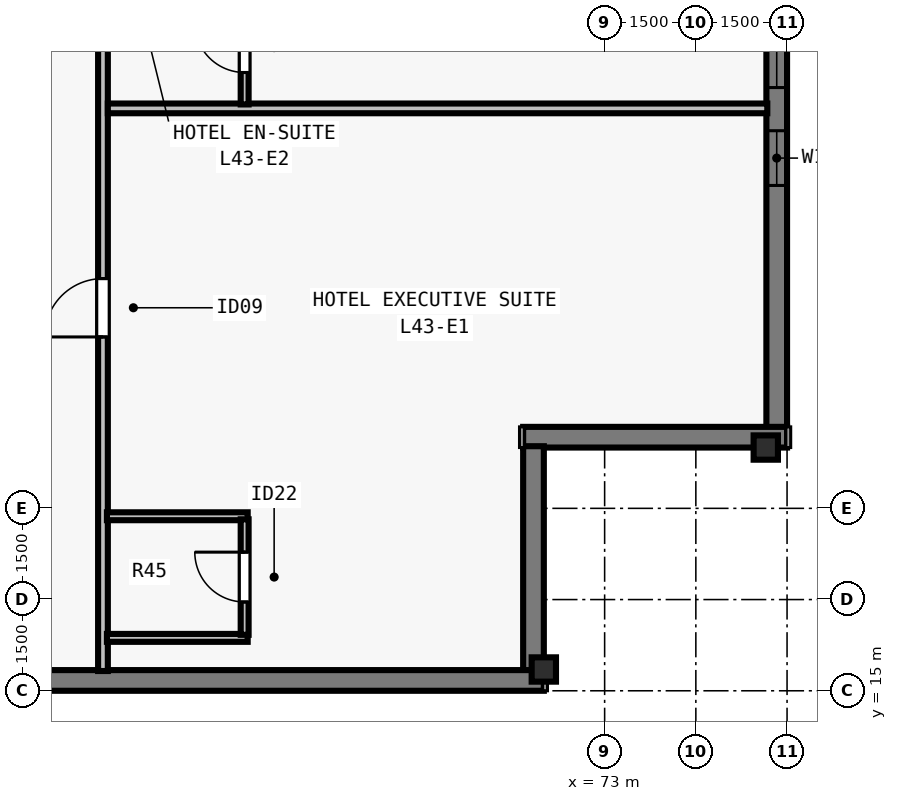
"""IFC4 building model, lengths in metres.
Left out: names, types, materials, properties, quantities, classifications, styles, units other than length and angle.
Written with IfcOpenShell. Run it as: python <this file> out.ifc"""

import sys

from ifc_helpers import new_model, si_unit, direction, frame, frame_2d, origin, origin_2d, place, context, subcontext, project, spatial, rectangle, i_section, extrude, element, fill, save


model = new_model("IFC4")
c1 = context("Model", 3, precision=1e-05, world=origin(), true_north=direction((0.0, 1.0)))
c2 = subcontext(c1, "Body", "Model", "MODEL_VIEW")
j1 = project(units=[si_unit("LENGTHUNIT", "METRE"), si_unit("PLANEANGLEUNIT", "RADIAN")], contexts=[c1])
p1 = place(None, origin())
s1 = spatial("IfcSite", under=j1, at=p1, CompositionType="ELEMENT")
p2 = place(p1, origin())
s2 = spatial("IfcBuilding", under=s1, at=p2, CompositionType="ELEMENT")
p3 = place(p2, frame((0.0, 0.0, 158.5)))
s3 = spatial("IfcBuildingStorey", under=s2, at=p3, CompositionType="ELEMENT", Elevation=158.5)
for number, where, z_axis, x_axis in (
    (1, (72.0, 15.35, 0.0), (0.0, 0.0, 1.0), (1.0, 0.0, 0.0)),
    (2, (75.65, 19.0, 0.0), (0.0, 0.0, 1.0), (0.0, 1.0, 0.0)),
):
    element("IfcColumn", number, at=place(p3, frame(where, z_axis=z_axis, x_axis=x_axis)), inside=s3, PredefinedType="COLUMN", context=c2, shape_type="SweptSolid", body=[
        extrude(i_section(OverallWidth=0.4, OverallDepth=0.4, WebThickness=0.022, FlangeThickness=0.036, at=origin_2d()), origin(), (0.0, 0.0, 1.0), 3.5),
    ])
p4 = place(p3, frame((75.83, 59.0, 0.0), z_axis=(0.0, 0.0, 1.0), x_axis=(0.0, -1.0, 0.0)))
e3 = element("IfcWall", 3, at=p4, inside=s3, PredefinedType="SOLIDWALL", context=c2, shape_type="SweptSolid", body=[
    extrude(rectangle(XDim=39.682, YDim=0.34, at=frame_2d((19.841, 0.0))), origin(), (0.0, 0.0, 1.0), 3.28),
])
p5 = place(p4, frame((6.002, 0.0, 0.8)))
e4 = element("IfcOpeningElement", 4, at=p5, cuts=e3, PredefinedType="OPENING", context=c2, shape_type="SweptSolid", body=[
    extrude(rectangle(XDim=1.75, YDim=1.66, at=frame_2d((0.875, 0.83))), frame((0.0, 0.18, 0.0), z_axis=(0.0, -1.0, 0.0), x_axis=(1.0, 0.0, 0.0)), (0.0, 0.0, 1.0), 0.36),
])
p6 = place(p4, frame((8.505, 0.0, 0.8)))
e5 = element("IfcOpeningElement", 5, at=p6, cuts=e3, PredefinedType="OPENING", context=c2, shape_type="SweptSolid", body=[
    extrude(rectangle(XDim=1.35, YDim=1.66, at=frame_2d((0.675, 0.83))), frame((0.0, 0.18, 0.0), z_axis=(0.0, -1.0, 0.0), x_axis=(1.0, 0.0, 0.0)), (0.0, 0.0, 1.0), 0.36),
])
p7 = place(p4, frame((11.859, 0.0, 0.8)))
e6 = element("IfcOpeningElement", 6, at=p7, cuts=e3, PredefinedType="OPENING", context=c2, shape_type="SweptSolid", body=[
    extrude(rectangle(XDim=1.75, YDim=1.66, at=frame_2d((0.875, 0.83))), frame((0.0, 0.18, 0.0), z_axis=(0.0, -1.0, 0.0), x_axis=(1.0, 0.0, 0.0)), (0.0, 0.0, 1.0), 0.36),
])
p8 = place(p4, frame((16.062, 0.0, 0.8)))
e7 = element("IfcOpeningElement", 7, at=p8, cuts=e3, PredefinedType="OPENING", context=c2, shape_type="SweptSolid", body=[
    extrude(rectangle(XDim=1.35, YDim=1.66, at=frame_2d((0.675, 0.83))), frame((0.0, 0.18, 0.0), z_axis=(0.0, -1.0, 0.0), x_axis=(1.0, 0.0, 0.0)), (0.0, 0.0, 1.0), 0.36),
])
p9 = place(p4, frame((18.966, 0.0, 0.8)))
e8 = element("IfcOpeningElement", 8, at=p9, cuts=e3, PredefinedType="OPENING", context=c2, shape_type="SweptSolid", body=[
    extrude(rectangle(XDim=1.75, YDim=1.66, at=frame_2d((0.875, 0.83))), frame((0.0, 0.18, 0.0), z_axis=(0.0, -1.0, 0.0), x_axis=(1.0, 0.0, 0.0)), (0.0, 0.0, 1.0), 0.36),
])
p10 = place(p4, frame((22.719, 0.0, 0.8)))
e9 = element("IfcOpeningElement", 9, at=p10, cuts=e3, PredefinedType="OPENING", context=c2, shape_type="SweptSolid", body=[
    extrude(rectangle(XDim=1.35, YDim=1.66, at=frame_2d((0.675, 0.83))), frame((0.0, 0.18, 0.0), z_axis=(0.0, -1.0, 0.0), x_axis=(1.0, 0.0, 0.0)), (0.0, 0.0, 1.0), 0.36),
])
p11 = place(p4, frame((26.073, 0.0, 0.8)))
e10 = element("IfcOpeningElement", 10, at=p11, cuts=e3, PredefinedType="OPENING", context=c2, shape_type="SweptSolid", body=[
    extrude(rectangle(XDim=1.75, YDim=1.66, at=frame_2d((0.875, 0.83))), frame((0.0, 0.18, 0.0), z_axis=(0.0, -1.0, 0.0), x_axis=(1.0, 0.0, 0.0)), (0.0, 0.0, 1.0), 0.36),
])
p12 = place(p4, frame((29.827, 0.0, 0.8)))
e11 = element("IfcOpeningElement", 11, at=p12, cuts=e3, PredefinedType="OPENING", context=c2, shape_type="SweptSolid", body=[
    extrude(rectangle(XDim=1.35, YDim=1.66, at=frame_2d((0.675, 0.83))), frame((0.0, 0.18, 0.0), z_axis=(0.0, -1.0, 0.0), x_axis=(1.0, 0.0, 0.0)), (0.0, 0.0, 1.0), 0.36),
])
p13 = place(p4, frame((32.33, 0.0, 0.8)))
e12 = element("IfcOpeningElement", 12, at=p13, cuts=e3, PredefinedType="OPENING", context=c2, shape_type="SweptSolid", body=[
    extrude(rectangle(XDim=1.75, YDim=1.66, at=frame_2d((0.875, 0.83))), frame((0.0, 0.18, 0.0), z_axis=(0.0, -1.0, 0.0), x_axis=(1.0, 0.0, 0.0)), (0.0, 0.0, 1.0), 0.36),
])
p14 = place(p4, frame((34.79, 0.0, 0.8)))
e13 = element("IfcOpeningElement", 13, at=p14, cuts=e3, PredefinedType="OPENING", context=c2, shape_type="SweptSolid", body=[
    extrude(rectangle(XDim=0.9, YDim=1.66, at=frame_2d((0.45, 0.83))), frame((0.0, 0.18, 0.0), z_axis=(0.0, -1.0, 0.0), x_axis=(1.0, 0.0, 0.0)), (0.0, 0.0, 1.0), 0.36),
])
p15 = place(p3, frame((76.0, 19.17, 0.0), z_axis=(0.0, 0.0, 1.0), x_axis=(-1.0, 0.0, 0.0)))
e14 = element("IfcWall", 14, at=p15, inside=s3, PredefinedType="SOLIDWALL", context=c2, shape_type="SweptSolid", body=[
    extrude(rectangle(XDim=4.34, YDim=0.34, at=frame_2d((2.17, 0.0))), origin(), (0.0, 0.0, 1.0), 3.28),
])
p16 = place(p3, frame((71.83, 19.022, 0.0), z_axis=(0.0, 0.0, 1.0), x_axis=(0.0, -1.0, 0.0)))
e15 = element("IfcWall", 15, at=p16, inside=s3, PredefinedType="SOLIDWALL", context=c2, shape_type="SweptSolid", body=[
    extrude(rectangle(XDim=3.704, YDim=0.34, at=frame_2d((1.852, 0.0))), origin(), (0.0, 0.0, 1.0), 3.28),
])
p17 = place(p3, frame((72.0, 15.17, 0.0), z_axis=(0.0, 0.0, 1.0), x_axis=(-1.0, 0.0, 0.0)))
e16 = element("IfcWall", 16, at=p17, inside=s3, PredefinedType="SOLIDWALL", context=c2, shape_type="SweptSolid", body=[
    extrude(rectangle(XDim=15.482, YDim=0.34, at=frame_2d((7.741, 0.0))), origin(), (0.0, 0.0, 1.0), 3.28),
])
p18 = place(p17, frame((11.627, 0.0, 0.8)))
e17 = element("IfcOpeningElement", 17, at=p18, cuts=e16, PredefinedType="OPENING", context=c2, shape_type="SweptSolid", body=[
    extrude(rectangle(XDim=1.75, YDim=1.66, at=frame_2d((0.875, 0.83))), frame((0.0, 0.18, 0.0), z_axis=(0.0, -1.0, 0.0), x_axis=(1.0, 0.0, 0.0)), (0.0, 0.0, 1.0), 0.36),
])
p19 = place(p3, frame((64.75, 15.325, 0.0), z_axis=(0.0, 0.0, 1.0), x_axis=(0.0, 1.0, 0.0)))
e18 = element("IfcWall", 18, at=p19, inside=s3, PredefinedType="PARTITIONING", context=c2, shape_type="SweptSolid", body=[
    extrude(rectangle(XDim=47.35, YDim=0.16, at=frame_2d((23.675, 0.0))), origin(), (0.0, 0.0, 1.0), 2.555),
])
p20 = place(p19, frame((5.494, 0.0, 0.0)))
e19 = element("IfcOpeningElement", 19, at=p20, cuts=e18, PredefinedType="OPENING", context=c2, shape_type="SweptSolid", body=[
    extrude(rectangle(XDim=0.96, YDim=2.15, at=frame_2d((0.48, 1.075))), frame((0.0, 0.09, 0.0), z_axis=(0.0, -1.0, 0.0), x_axis=(1.0, 0.0, 0.0)), (0.0, 0.0, 1.0), 0.18),
])
p21 = place(p19, frame((14.796, 0.0, 0.0)))
e20 = element("IfcOpeningElement", 20, at=p21, cuts=e18, PredefinedType="OPENING", context=c2, shape_type="SweptSolid", body=[
    extrude(rectangle(XDim=0.96, YDim=2.15, at=frame_2d((0.48, 1.075))), frame((0.0, 0.09, 0.0), z_axis=(0.0, -1.0, 0.0), x_axis=(1.0, 0.0, 0.0)), (0.0, 0.0, 1.0), 0.18),
])
p22 = place(p19, frame((24.228, 0.0, 0.0)))
e21 = element("IfcOpeningElement", 21, at=p22, cuts=e18, PredefinedType="OPENING", context=c2, shape_type="SweptSolid", body=[
    extrude(rectangle(XDim=0.96, YDim=2.15, at=frame_2d((0.48, 1.075))), frame((0.0, 0.09, 0.0), z_axis=(0.0, -1.0, 0.0), x_axis=(1.0, 0.0, 0.0)), (0.0, 0.0, 1.0), 0.18),
])
p23 = place(p19, frame((33.66, 0.0, 0.0)))
e22 = element("IfcOpeningElement", 22, at=p23, cuts=e18, PredefinedType="OPENING", context=c2, shape_type="SweptSolid", body=[
    extrude(rectangle(XDim=0.96, YDim=2.15, at=frame_2d((0.48, 1.075))), frame((0.0, 0.09, 0.0), z_axis=(0.0, -1.0, 0.0), x_axis=(1.0, 0.0, 0.0)), (0.0, 0.0, 1.0), 0.18),
])
p24 = place(p19, frame((43.229, 0.0, 0.0)))
e23 = element("IfcOpeningElement", 23, at=p24, cuts=e18, PredefinedType="OPENING", context=c2, shape_type="SweptSolid", body=[
    extrude(rectangle(XDim=0.96, YDim=2.15, at=frame_2d((0.48, 1.075))), frame((0.0, 0.09, 0.0), z_axis=(0.0, -1.0, 0.0), x_axis=(1.0, 0.0, 0.0)), (0.0, 0.0, 1.0), 0.18),
])
for number, where, z_axis, x_axis in (
    (24, (64.815, 15.87, 0.0), (0.0, 0.0, 1.0), (1.0, 0.0, 0.0)),
    (25, (64.815, 17.87, 0.0), (0.0, 0.0, 1.0), (1.0, 0.0, 0.0)),
):
    element("IfcWall", number, at=place(p3, frame(where, z_axis=z_axis, x_axis=x_axis)), inside=s3, PredefinedType="PLUMBINGWALL", context=c2, shape_type="SweptSolid", body=[
        extrude(rectangle(XDim=2.315, YDim=0.13, at=frame_2d((1.157, 0.0))), origin(), (0.0, 0.0, 1.0), 3.28),
    ])
p25 = place(p3, frame((67.08, 15.92, 0.0), z_axis=(0.0, 0.0, 1.0), x_axis=(0.0, 1.0, 0.0)))
e26 = element("IfcWall", 26, at=p25, inside=s3, PredefinedType="PLUMBINGWALL", context=c2, shape_type="SweptSolid", body=[
    extrude(rectangle(XDim=1.9, YDim=0.13, at=frame_2d((0.95, 0.0))), origin(), (0.0, 0.0, 1.0), 3.28),
])
p26 = place(p25, frame((0.54, 0.0, 0.0)))
e27 = element("IfcOpeningElement", 27, at=p26, cuts=e26, PredefinedType="OPENING", context=c2, shape_type="SweptSolid", body=[
    extrude(rectangle(XDim=0.82, YDim=2.1, at=frame_2d((0.41, 1.05))), frame((0.0, 0.075, 0.0), z_axis=(0.0, -1.0, 0.0), x_axis=(1.0, 0.0, 0.0)), (0.0, 0.0, 1.0), 0.15),
])
p27 = place(p3, frame((64.83, 24.577, 0.0), z_axis=(0.0, 0.0, 1.0), x_axis=(1.0, 0.0, 0.0)))
e28 = element("IfcWall", 28, at=p27, inside=s3, PredefinedType="PARTITIONING", context=c2, shape_type="SweptSolid", body=[
    extrude(rectangle(XDim=10.845, YDim=0.16, at=frame_2d((5.422, 0.0))), origin(), (0.0, 0.0, 1.0), 2.896),
])
p28 = place(p3, frame((67.08, 24.642, 0.0), z_axis=(0.0, 0.0, 1.0), x_axis=(0.0, 1.0, 0.0)))
e29 = element("IfcWall", 29, at=p28, inside=s3, PredefinedType="PLUMBINGWALL", context=c2, shape_type="SweptSolid", body=[
    extrude(rectangle(XDim=1.885, YDim=0.13, at=frame_2d((0.942, 0.0))), origin(), (0.0, 0.0, 1.0), 3.28),
])
p29 = place(p28, frame((0.525, 0.0, 0.0)))
e30 = element("IfcOpeningElement", 30, at=p29, cuts=e29, PredefinedType="OPENING", context=c2, shape_type="SweptSolid", body=[
    extrude(rectangle(XDim=0.82, YDim=2.1, at=frame_2d((0.41, 1.05))), frame((0.0, 0.075, 0.0), z_axis=(0.0, -1.0, 0.0), x_axis=(1.0, 0.0, 0.0)), (0.0, 0.0, 1.0), 0.15),
])
p30 = place(p13, origin())
e31 = element("IfcWindow", 31, at=p30, inside=s3, PartitioningType="SINGLE_PANEL", PredefinedType="WINDOW", context=c2, shape_type="SweptSolid", body=[
    extrude(rectangle(XDim=1.75, YDim=1.66, at=frame_2d((0.875, 0.83))), frame((0.0, -0.05, 0.0), z_axis=(0.0, -1.0, 0.0), x_axis=(1.0, 0.0, 0.0)), (0.0, 0.0, 1.0), 0.06),
])
fill(e12, e31)
p31 = place(p14, origin())
e32 = element("IfcWindow", 32, at=p31, inside=s3, PartitioningType="SINGLE_PANEL", PredefinedType="WINDOW", context=c2, shape_type="SweptSolid", body=[
    extrude(rectangle(XDim=0.9, YDim=1.66, at=frame_2d((0.45, 0.83))), frame((0.0, -0.04, 0.0), z_axis=(0.0, -1.0, 0.0), x_axis=(1.0, 0.0, 0.0)), (0.0, 0.0, 1.0), 0.06),
])
fill(e13, e32)
p32 = place(p26, origin())
e33 = element("IfcDoor", 33, at=p32, inside=s3, OperationType="SINGLE_SWING_RIGHT", PredefinedType="DOOR", context=c2, shape_type="SweptSolid", body=[
    extrude(rectangle(XDim=0.82, YDim=2.1, at=frame_2d((0.41, 1.05))), frame((0.0, 0.025, 0.0), z_axis=(0.0, -1.0, 0.0), x_axis=(1.0, 0.0, 0.0)), (0.0, 0.0, 1.0), 0.05),
])
fill(e27, e33)
p33 = place(p20, origin())
e34 = element("IfcDoor", 34, at=p33, inside=s3, OperationType="SINGLE_SWING_LEFT", PredefinedType="DOOR", context=c2, shape_type="SweptSolid", body=[
    extrude(rectangle(XDim=0.96, YDim=2.15, at=frame_2d((0.48, 1.075))), frame((0.0, 0.025, 0.0), z_axis=(0.0, -1.0, 0.0), x_axis=(1.0, 0.0, 0.0)), (0.0, 0.0, 1.0), 0.05),
])
fill(e19, e34)
p34 = place(p29, origin())
e35 = element("IfcDoor", 35, at=p34, inside=s3, OperationType="SINGLE_SWING_RIGHT", PredefinedType="DOOR", context=c2, shape_type="SweptSolid", body=[
    extrude(rectangle(XDim=0.82, YDim=2.1, at=frame_2d((0.41, 1.05))), frame((0.0, 0.025, 0.0), z_axis=(0.0, -1.0, 0.0), x_axis=(1.0, 0.0, 0.0)), (0.0, 0.0, 1.0), 0.05),
])
fill(e30, e35)
save(model, sys.argv[1])
